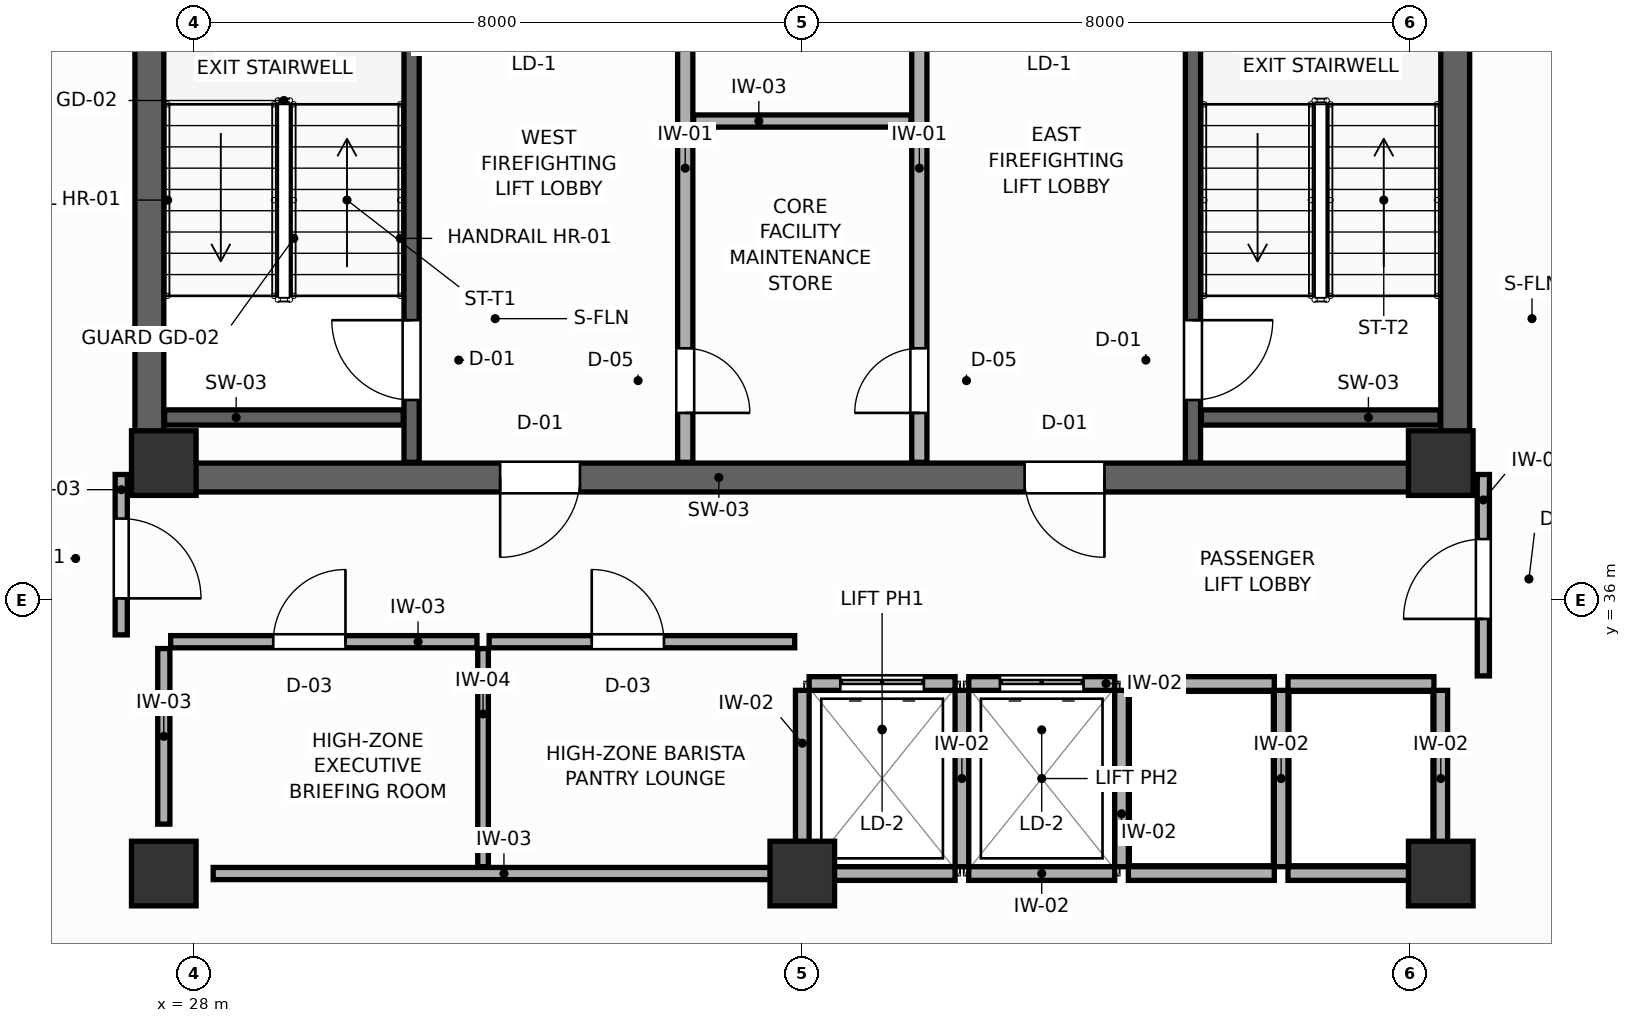
"""IFC4 building model, lengths in metres.
Left out: names, types, materials, properties, quantities, classifications, styles, units other than length and angle.
Written with IfcOpenShell. Run it as: python <this file> out.ifc"""

import sys

from ifc_helpers import new_model, si_unit, direction, frame, frame_2d, origin, origin_2d, place, context, subcontext, project, spatial, rectangle, extrude, source, transform, mapped, element, fill, save


model = new_model("IFC4")
c1 = context("Model", 3, precision=1e-05, world=origin(), true_north=direction((0.0, 1.0)))
c2 = subcontext(c1, "Body", "Model", "MODEL_VIEW")
j1 = project(units=[si_unit("LENGTHUNIT", "METRE"), si_unit("PLANEANGLEUNIT", "RADIAN")], contexts=[c1])
p1 = place(None, origin())
s1 = spatial("IfcSite", under=j1, at=p1, CompositionType="ELEMENT")
p2 = place(p1, origin())
s2 = spatial("IfcBuilding", under=s1, at=p2, CompositionType="ELEMENT")
p3 = place(p2, frame((0.0, 0.0, 246.6)))
s3 = spatial("IfcBuildingStorey", under=s2, at=p3, CompositionType="ELEMENT", Elevation=246.6)
p4 = place(p3, frame((27.22, 37.61, 0.0), z_axis=(0.0, 0.0, 1.0), x_axis=(1.0, 0.0, 0.0)))
e1 = element("IfcWall", 1, at=p4, inside=s3, PredefinedType="SHEAR", context=c2, shape_type="SweptSolid", body=[
    extrude(rectangle(XDim=17.56, YDim=0.38, at=frame_2d((8.78, 0.0))), origin(), (0.0, 0.0, 1.0), 3.6),
])
p5 = place(p4, frame((4.805, 0.0, 0.0)))
e2 = element("IfcOpeningElement", 2, at=p5, cuts=e1, PredefinedType="OPENING", context=c2, shape_type="SweptSolid", body=[
    extrude(rectangle(XDim=1.05, YDim=2.1, at=frame_2d((0.525, 1.05))), frame((0.0, 0.2, 0.0), z_axis=(0.0, -1.0, 0.0), x_axis=(1.0, 0.0, 0.0)), (0.0, 0.0, 1.0), 0.4),
])
p6 = place(p4, frame((11.705, 0.0, 0.0)))
e3 = element("IfcOpeningElement", 3, at=p6, cuts=e1, PredefinedType="OPENING", context=c2, shape_type="SweptSolid", body=[
    extrude(rectangle(XDim=1.05, YDim=2.1, at=frame_2d((0.525, 1.05))), frame((0.0, 0.2, 0.0), z_axis=(0.0, -1.0, 0.0), x_axis=(1.0, 0.0, 0.0)), (0.0, 0.0, 1.0), 0.4),
])
for number, where, z_axis, x_axis in (
    (4, (27.41, 37.8, 0.0), (0.0, 0.0, 1.0), (0.0, 1.0, 0.0)),
    (5, (44.59, 37.8, 0.0), (0.0, 0.0, 1.0), (0.0, 1.0, 0.0)),
):
    element("IfcWall", number, at=place(p3, frame(where, z_axis=z_axis, x_axis=x_axis)), inside=s3, PredefinedType="SHEAR", context=c2, shape_type="SweptSolid", body=[
        extrude(rectangle(XDim=9.0, YDim=0.38, at=frame_2d((4.5, 0.0))), origin(), (0.0, 0.0, 1.0), 3.6),
    ])
m1 = source(origin(), c2, "Body", "SweptSolid", [
    extrude(rectangle(XDim=0.85, YDim=0.85, at=origin_2d()), origin(), (0.0, 0.0, 1.0), 3.6),
])
for number, where, z_axis, x_axis in (
    (6, (27.6, 37.8, 0.0), (0.0, 0.0, 1.0), (1.0, 0.0, 0.0)),
    (7, (44.4, 37.8, 0.0), (0.0, 0.0, 1.0), (1.0, 0.0, 0.0)),
    (8, (27.6, 32.4, 0.0), (0.0, 0.0, 1.0), (1.0, 0.0, 0.0)),
    (9, (44.4, 32.4, 0.0), (0.0, 0.0, 1.0), (1.0, 0.0, 0.0)),
    (10, (36.0, 32.4, 0.0), (0.0, 0.0, 1.0), (1.0, 0.0, 0.0)),
):
    element("IfcColumn", number, at=place(p3, frame(where, z_axis=z_axis, x_axis=x_axis)), inside=s3, PredefinedType="COLUMN", context=c2, shape_type="MappedRepresentation", body=[
        mapped(m1, transform((0.0, 0.0, 0.0), scale=1.0)),
    ])
p7 = place(p3, frame((30.86, 37.81, 0.0), z_axis=(0.0, 0.0, 1.0), x_axis=(0.0, 1.0, 0.0)))
e11 = element("IfcWall", 11, at=p7, inside=s3, PredefinedType="SHEAR", context=c2, shape_type="SweptSolid", body=[
    extrude(rectangle(XDim=8.98, YDim=0.2, at=frame_2d((4.49, 0.0))), origin(), (0.0, 0.0, 1.0), 3.6),
])
p8 = place(p7, frame((0.82, 0.0, 0.0)))
e12 = element("IfcOpeningElement", 12, at=p8, cuts=e11, PredefinedType="OPENING", context=c2, shape_type="SweptSolid", body=[
    extrude(rectangle(XDim=1.05, YDim=2.1, at=frame_2d((0.525, 1.05))), frame((0.0, 0.11, 0.0), z_axis=(0.0, -1.0, 0.0), x_axis=(1.0, 0.0, 0.0)), (0.0, 0.0, 1.0), 0.22),
])
p9 = place(p3, frame((27.61, 38.4, 0.0), z_axis=(0.0, 0.0, 1.0), x_axis=(1.0, 0.0, 0.0)))
e13 = element("IfcWall", 13, at=p9, inside=s3, PredefinedType="SHEAR", context=c2, shape_type="SweptSolid", body=[
    extrude(rectangle(XDim=3.14, YDim=0.2, at=frame_2d((1.57, 0.0))), origin(), (0.0, 0.0, 1.0), 3.6),
])
p10 = place(p3, frame((41.14, 37.81, 0.0), z_axis=(0.0, 0.0, 1.0), x_axis=(0.0, 1.0, 0.0)))
e14 = element("IfcWall", 14, at=p10, inside=s3, PredefinedType="SHEAR", context=c2, shape_type="SweptSolid", body=[
    extrude(rectangle(XDim=8.98, YDim=0.2, at=frame_2d((4.49, 0.0))), origin(), (0.0, 0.0, 1.0), 3.6),
])
p11 = place(p10, frame((0.82, 0.0, 0.0)))
e15 = element("IfcOpeningElement", 15, at=p11, cuts=e14, PredefinedType="OPENING", context=c2, shape_type="SweptSolid", body=[
    extrude(rectangle(XDim=1.05, YDim=2.1, at=frame_2d((0.525, 1.05))), frame((0.0, 0.11, 0.0), z_axis=(0.0, -1.0, 0.0), x_axis=(1.0, 0.0, 0.0)), (0.0, 0.0, 1.0), 0.22),
])
p12 = place(p3, frame((41.25, 38.4, 0.0), z_axis=(0.0, 0.0, 1.0), x_axis=(1.0, 0.0, 0.0)))
e16 = element("IfcWall", 16, at=p12, inside=s3, PredefinedType="SHEAR", context=c2, shape_type="SweptSolid", body=[
    extrude(rectangle(XDim=3.14, YDim=0.2, at=frame_2d((1.57, 0.0))), origin(), (0.0, 0.0, 1.0), 3.6),
])
p13 = place(p3, frame((34.46, 37.81, 0.0), z_axis=(0.0, 0.0, 1.0), x_axis=(0.0, 1.0, 0.0)))
e17 = element("IfcWall", 17, at=p13, inside=s3, PredefinedType="PARTITIONING", context=c2, shape_type="SweptSolid", body=[
    extrude(rectangle(XDim=8.98, YDim=0.2, at=frame_2d((4.49, 0.0))), origin(), (0.0, 0.0, 1.0), 3.41),
])
p14 = place(p13, frame((0.65, 0.0, 0.0)))
e18 = element("IfcOpeningElement", 18, at=p14, cuts=e17, PredefinedType="OPENING", context=c2, shape_type="SweptSolid", body=[
    extrude(rectangle(XDim=0.85, YDim=2.05, at=frame_2d((0.425, 1.025))), frame((0.0, 0.11, 0.0), z_axis=(0.0, -1.0, 0.0), x_axis=(1.0, 0.0, 0.0)), (0.0, 0.0, 1.0), 0.22),
])
p15 = place(p3, frame((37.54, 37.81, 0.0), z_axis=(0.0, 0.0, 1.0), x_axis=(0.0, 1.0, 0.0)))
e19 = element("IfcWall", 19, at=p15, inside=s3, PredefinedType="PARTITIONING", context=c2, shape_type="SweptSolid", body=[
    extrude(rectangle(XDim=8.98, YDim=0.2, at=frame_2d((4.49, 0.0))), origin(), (0.0, 0.0, 1.0), 3.41),
])
p16 = place(p15, frame((0.65, 0.0, 0.0)))
e20 = element("IfcOpeningElement", 20, at=p16, cuts=e19, PredefinedType="OPENING", context=c2, shape_type="SweptSolid", body=[
    extrude(rectangle(XDim=0.85, YDim=2.05, at=frame_2d((0.425, 1.025))), frame((0.0, 0.11, 0.0), z_axis=(0.0, -1.0, 0.0), x_axis=(1.0, 0.0, 0.0)), (0.0, 0.0, 1.0), 0.22),
])
p17 = place(p3, frame((34.57, 42.3, 0.0), z_axis=(0.0, 0.0, 1.0), x_axis=(1.0, 0.0, 0.0)))
e21 = element("IfcWall", 21, at=p17, inside=s3, PredefinedType="PARTITIONING", context=c2, shape_type="SweptSolid", body=[
    extrude(rectangle(XDim=2.86, YDim=0.16, at=frame_2d((1.43, 0.0))), origin(), (0.0, 0.0, 1.0), 3.41),
])
p18 = place(p3, frame((36.09, 34.9, 0.0), z_axis=(0.0, 0.0, 1.0), x_axis=(1.0, 0.0, 0.0)))
e22 = element("IfcWall", 22, at=p18, inside=s3, PredefinedType="PARTITIONING", context=c2, shape_type="SweptSolid", body=[
    extrude(rectangle(XDim=1.92, YDim=0.18, at=frame_2d((0.96, 0.0))), origin(), (0.0, 0.0, 1.0), 3.41),
])
p19 = place(p18, frame((0.41, 0.0, 0.0)))
e23 = element("IfcOpeningElement", 23, at=p19, cuts=e22, PredefinedType="OPENING", context=c2, shape_type="SweptSolid", body=[
    extrude(rectangle(XDim=1.1, YDim=2.1, at=frame_2d((0.55, 1.05))), frame((0.0, 0.1, 0.0), z_axis=(0.0, -1.0, 0.0), x_axis=(1.0, 0.0, 0.0)), (0.0, 0.0, 1.0), 0.2),
])
p20 = place(p3, frame((36.09, 32.4, 0.0), z_axis=(0.0, 0.0, 1.0), x_axis=(1.0, 0.0, 0.0)))
e24 = element("IfcWall", 24, at=p20, inside=s3, PredefinedType="PARTITIONING", context=c2, shape_type="SweptSolid", body=[
    extrude(rectangle(XDim=1.92, YDim=0.18, at=frame_2d((0.96, 0.0))), origin(), (0.0, 0.0, 1.0), 3.08),
])
p21 = place(p3, frame((36.0, 32.49, 0.0), z_axis=(0.0, 0.0, 1.0), x_axis=(0.0, 1.0, 0.0)))
e25 = element("IfcWall", 25, at=p21, inside=s3, PredefinedType="PARTITIONING", context=c2, shape_type="SweptSolid", body=[
    extrude(rectangle(XDim=2.32, YDim=0.18, at=frame_2d((1.16, 0.0))), origin(), (0.0, 0.0, 1.0), 3.41),
])
p22 = place(p3, frame((38.19, 34.9, 0.0), z_axis=(0.0, 0.0, 1.0), x_axis=(1.0, 0.0, 0.0)))
e26 = element("IfcWall", 26, at=p22, inside=s3, PredefinedType="PARTITIONING", context=c2, shape_type="SweptSolid", body=[
    extrude(rectangle(XDim=1.92, YDim=0.18, at=frame_2d((0.96, 0.0))), origin(), (0.0, 0.0, 1.0), 3.41),
])
p23 = place(p22, frame((0.41, 0.0, 0.0)))
e27 = element("IfcOpeningElement", 27, at=p23, cuts=e26, PredefinedType="OPENING", context=c2, shape_type="SweptSolid", body=[
    extrude(rectangle(XDim=1.1, YDim=2.1, at=frame_2d((0.55, 1.05))), frame((0.0, 0.1, 0.0), z_axis=(0.0, -1.0, 0.0), x_axis=(1.0, 0.0, 0.0)), (0.0, 0.0, 1.0), 0.2),
])
p24 = place(p3, frame((38.19, 32.4, 0.0), z_axis=(0.0, 0.0, 1.0), x_axis=(1.0, 0.0, 0.0)))
e28 = element("IfcWall", 28, at=p24, inside=s3, PredefinedType="PARTITIONING", context=c2, shape_type="SweptSolid", body=[
    extrude(rectangle(XDim=1.92, YDim=0.18, at=frame_2d((0.96, 0.0))), origin(), (0.0, 0.0, 1.0), 3.08),
])
p25 = place(p3, frame((38.1, 32.49, 0.0), z_axis=(0.0, 0.0, 1.0), x_axis=(0.0, 1.0, 0.0)))
e29 = element("IfcWall", 29, at=p25, inside=s3, PredefinedType="PARTITIONING", context=c2, shape_type="SweptSolid", body=[
    extrude(rectangle(XDim=2.32, YDim=0.18, at=frame_2d((1.16, 0.0))), origin(), (0.0, 0.0, 1.0), 3.41),
])
p26 = place(p3, frame((40.29, 34.9, 0.0), z_axis=(0.0, 0.0, 1.0), x_axis=(1.0, 0.0, 0.0)))
e30 = element("IfcWall", 30, at=p26, inside=s3, PredefinedType="PARTITIONING", context=c2, shape_type="SweptSolid", body=[
    extrude(rectangle(XDim=1.92, YDim=0.18, at=frame_2d((0.96, 0.0))), origin(), (0.0, 0.0, 1.0), 3.41),
])
p27 = place(p3, frame((40.29, 32.4, 0.0), z_axis=(0.0, 0.0, 1.0), x_axis=(1.0, 0.0, 0.0)))
e31 = element("IfcWall", 31, at=p27, inside=s3, PredefinedType="PARTITIONING", context=c2, shape_type="SweptSolid", body=[
    extrude(rectangle(XDim=1.92, YDim=0.18, at=frame_2d((0.96, 0.0))), origin(), (0.0, 0.0, 1.0), 3.08),
])
p28 = place(p3, frame((40.2, 32.49, 0.0), z_axis=(0.0, 0.0, 1.0), x_axis=(0.0, 1.0, 0.0)))
e32 = element("IfcWall", 32, at=p28, inside=s3, PredefinedType="PARTITIONING", context=c2, shape_type="SweptSolid", body=[
    extrude(rectangle(XDim=2.32, YDim=0.18, at=frame_2d((1.16, 0.0))), origin(), (0.0, 0.0, 1.0), 3.41),
])
p29 = place(p3, frame((42.39, 34.9, 0.0), z_axis=(0.0, 0.0, 1.0), x_axis=(1.0, 0.0, 0.0)))
e33 = element("IfcWall", 33, at=p29, inside=s3, PredefinedType="PARTITIONING", context=c2, shape_type="SweptSolid", body=[
    extrude(rectangle(XDim=1.92, YDim=0.18, at=frame_2d((0.96, 0.0))), origin(), (0.0, 0.0, 1.0), 3.41),
])
p30 = place(p3, frame((42.39, 32.4, 0.0), z_axis=(0.0, 0.0, 1.0), x_axis=(1.0, 0.0, 0.0)))
e34 = element("IfcWall", 34, at=p30, inside=s3, PredefinedType="PARTITIONING", context=c2, shape_type="SweptSolid", body=[
    extrude(rectangle(XDim=1.92, YDim=0.18, at=frame_2d((0.96, 0.0))), origin(), (0.0, 0.0, 1.0), 3.08),
])
for number, where, z_axis, x_axis in (
    (35, (42.3, 32.49, 0.0), (0.0, 0.0, 1.0), (0.0, 1.0, 0.0)),
    (36, (44.4, 32.49, 0.0), (0.0, 0.0, 1.0), (0.0, 1.0, 0.0)),
):
    element("IfcWall", number, at=place(p3, frame(where, z_axis=z_axis, x_axis=x_axis)), inside=s3, PredefinedType="PARTITIONING", context=c2, shape_type="SweptSolid", body=[
        extrude(rectangle(XDim=2.32, YDim=0.18, at=frame_2d((1.16, 0.0))), origin(), (0.0, 0.0, 1.0), 3.41),
    ])
p31 = place(p3, frame((28.25, 32.4, 0.0), z_axis=(0.0, 0.0, 1.0), x_axis=(1.0, 0.0, 0.0)))
e37 = element("IfcWall", 37, at=p31, inside=s3, PredefinedType="PARTITIONING", context=c2, shape_type="SweptSolid", body=[
    extrude(rectangle(XDim=7.65, YDim=0.16, at=frame_2d((3.825, 0.0))), origin(), (0.0, 0.0, 1.0), 3.08),
])
p32 = place(p3, frame((27.6, 33.05, 0.0), z_axis=(0.0, 0.0, 1.0), x_axis=(0.0, 1.0, 0.0)))
e38 = element("IfcWall", 38, at=p32, inside=s3, PredefinedType="PARTITIONING", context=c2, shape_type="SweptSolid", body=[
    extrude(rectangle(XDim=2.31, YDim=0.16, at=frame_2d((1.155, 0.0))), origin(), (0.0, 0.0, 1.0), 3.41),
])
p33 = place(p3, frame((31.8, 32.49, 0.0), z_axis=(0.0, 0.0, 1.0), x_axis=(0.0, 1.0, 0.0)))
e39 = element("IfcWall", 39, at=p33, inside=s3, PredefinedType="PARTITIONING", context=c2, shape_type="SweptSolid", body=[
    extrude(rectangle(XDim=2.87, YDim=0.14, at=frame_2d((1.435, 0.0))), origin(), (0.0, 0.0, 1.0), 3.41),
])
p34 = place(p3, frame((27.69, 35.45, 0.0), z_axis=(0.0, 0.0, 1.0), x_axis=(1.0, 0.0, 0.0)))
e40 = element("IfcWall", 40, at=p34, inside=s3, PredefinedType="PARTITIONING", context=c2, shape_type="SweptSolid", body=[
    extrude(rectangle(XDim=4.03, YDim=0.16, at=frame_2d((2.015, 0.0))), origin(), (0.0, 0.0, 1.0), 3.41),
])
p35 = place(p34, frame((1.35, 0.0, 0.0)))
e41 = element("IfcOpeningElement", 41, at=p35, cuts=e40, PredefinedType="OPENING", context=c2, shape_type="SweptSolid", body=[
    extrude(rectangle(XDim=0.95, YDim=2.05, at=frame_2d((0.475, 1.025))), frame((0.0, 0.09, 0.0), z_axis=(0.0, -1.0, 0.0), x_axis=(1.0, 0.0, 0.0)), (0.0, 0.0, 1.0), 0.18),
])
p36 = place(p3, frame((31.88, 35.45, 0.0), z_axis=(0.0, 0.0, 1.0), x_axis=(1.0, 0.0, 0.0)))
e42 = element("IfcWall", 42, at=p36, inside=s3, PredefinedType="PARTITIONING", context=c2, shape_type="SweptSolid", body=[
    extrude(rectangle(XDim=4.02, YDim=0.16, at=frame_2d((2.01, 0.0))), origin(), (0.0, 0.0, 1.0), 3.41),
])
p37 = place(p36, frame((1.35, 0.0, 0.0)))
e43 = element("IfcOpeningElement", 43, at=p37, cuts=e42, PredefinedType="OPENING", context=c2, shape_type="SweptSolid", body=[
    extrude(rectangle(XDim=0.95, YDim=2.05, at=frame_2d((0.475, 1.025))), frame((0.0, 0.09, 0.0), z_axis=(0.0, -1.0, 0.0), x_axis=(1.0, 0.0, 0.0)), (0.0, 0.0, 1.0), 0.18),
])
p38 = place(p3, frame((27.04, 35.54, 0.0), z_axis=(0.0, 0.0, 1.0), x_axis=(0.0, 1.0, 0.0)))
e44 = element("IfcWall", 44, at=p38, inside=s3, PredefinedType="PARTITIONING", context=c2, shape_type="SweptSolid", body=[
    extrude(rectangle(XDim=2.11, YDim=0.16, at=frame_2d((1.055, 0.0))), origin(), (0.0, 0.0, 1.0), 3.41),
])
p39 = place(p38, frame((0.48, 0.0, 0.0)))
e45 = element("IfcOpeningElement", 45, at=p39, cuts=e44, PredefinedType="OPENING", context=c2, shape_type="SweptSolid", body=[
    extrude(rectangle(XDim=1.05, YDim=2.1, at=frame_2d((0.525, 1.05))), frame((0.0, 0.09, 0.0), z_axis=(0.0, -1.0, 0.0), x_axis=(1.0, 0.0, 0.0)), (0.0, 0.0, 1.0), 0.18),
])
p40 = place(p3, frame((44.96, 35.0, 0.0), z_axis=(0.0, 0.0, 1.0), x_axis=(0.0, 1.0, 0.0)))
e46 = element("IfcWall", 46, at=p40, inside=s3, PredefinedType="PARTITIONING", context=c2, shape_type="SweptSolid", body=[
    extrude(rectangle(XDim=2.65, YDim=0.16, at=frame_2d((1.325, 0.0))), origin(), (0.0, 0.0, 1.0), 3.41),
])
p41 = place(p40, frame((0.75, 0.0, 0.0)))
e47 = element("IfcOpeningElement", 47, at=p41, cuts=e46, PredefinedType="OPENING", context=c2, shape_type="SweptSolid", body=[
    extrude(rectangle(XDim=1.05, YDim=2.1, at=frame_2d((0.525, 1.05))), frame((0.0, 0.09, 0.0), z_axis=(0.0, -1.0, 0.0), x_axis=(1.0, 0.0, 0.0)), (0.0, 0.0, 1.0), 0.18),
])
p42 = place(p8, origin())
e48 = element("IfcDoor", 48, at=p42, inside=s3, OperationType="SINGLE_SWING_RIGHT", PredefinedType="DOOR", context=c2, shape_type="SweptSolid", body=[
    extrude(rectangle(XDim=1.05, YDim=2.1, at=frame_2d((0.525, 1.05))), frame((0.0, 0.025, 0.0), z_axis=(0.0, -1.0, 0.0), x_axis=(1.0, 0.0, 0.0)), (0.0, 0.0, 1.0), 0.05),
])
fill(e12, e48)
p43 = place(p11, frame((1.05, 0.0, 0.0), z_axis=(0.0, 0.0, 1.0), x_axis=(-1.0, 0.0, 0.0)))
e49 = element("IfcDoor", 49, at=p43, inside=s3, OperationType="SINGLE_SWING_LEFT", PredefinedType="DOOR", context=c2, shape_type="SweptSolid", body=[
    extrude(rectangle(XDim=1.05, YDim=2.1, at=frame_2d((0.525, 1.05))), frame((0.0, 0.025, 0.0), z_axis=(0.0, -1.0, 0.0), x_axis=(1.0, 0.0, 0.0)), (0.0, 0.0, 1.0), 0.05),
])
fill(e15, e49)
p44 = place(p14, frame((0.85, 0.0, 0.0), z_axis=(0.0, 0.0, 1.0), x_axis=(-1.0, 0.0, 0.0)))
e50 = element("IfcDoor", 50, at=p44, inside=s3, OperationType="SINGLE_SWING_RIGHT", PredefinedType="DOOR", context=c2, shape_type="SweptSolid", body=[
    extrude(rectangle(XDim=0.85, YDim=2.05, at=frame_2d((0.425, 1.025))), frame((0.0, 0.025, 0.0), z_axis=(0.0, -1.0, 0.0), x_axis=(1.0, 0.0, 0.0)), (0.0, 0.0, 1.0), 0.05),
])
fill(e18, e50)
p45 = place(p16, origin())
e51 = element("IfcDoor", 51, at=p45, inside=s3, OperationType="SINGLE_SWING_LEFT", PredefinedType="DOOR", context=c2, shape_type="SweptSolid", body=[
    extrude(rectangle(XDim=0.85, YDim=2.05, at=frame_2d((0.425, 1.025))), frame((0.0, 0.025, 0.0), z_axis=(0.0, -1.0, 0.0), x_axis=(1.0, 0.0, 0.0)), (0.0, 0.0, 1.0), 0.05),
])
fill(e20, e51)
p46 = place(p19, origin())
e52 = element("IfcDoor", 52, at=p46, inside=s3, OperationType="DOUBLE_DOOR_SLIDING", PredefinedType="DOOR", context=c2, shape_type="SweptSolid", body=[
    extrude(rectangle(XDim=1.1, YDim=2.1, at=frame_2d((0.55, 1.05))), frame((0.0, 0.025, 0.0), z_axis=(0.0, -1.0, 0.0), x_axis=(1.0, 0.0, 0.0)), (0.0, 0.0, 1.0), 0.05),
])
fill(e23, e52)
p47 = place(p23, origin())
e53 = element("IfcDoor", 53, at=p47, inside=s3, OperationType="DOUBLE_DOOR_SLIDING", PredefinedType="DOOR", context=c2, shape_type="SweptSolid", body=[
    extrude(rectangle(XDim=1.1, YDim=2.1, at=frame_2d((0.55, 1.05))), frame((0.0, 0.025, 0.0), z_axis=(0.0, -1.0, 0.0), x_axis=(1.0, 0.0, 0.0)), (0.0, 0.0, 1.0), 0.05),
])
fill(e27, e53)
p48 = place(p35, origin())
e54 = element("IfcDoor", 54, at=p48, inside=s3, OperationType="SINGLE_SWING_RIGHT", PredefinedType="DOOR", context=c2, shape_type="SweptSolid", body=[
    extrude(rectangle(XDim=0.95, YDim=2.05, at=frame_2d((0.475, 1.025))), frame((0.0, 0.025, 0.0), z_axis=(0.0, -1.0, 0.0), x_axis=(1.0, 0.0, 0.0)), (0.0, 0.0, 1.0), 0.05),
])
fill(e41, e54)
p49 = place(p37, origin())
e55 = element("IfcDoor", 55, at=p49, inside=s3, OperationType="SINGLE_SWING_LEFT", PredefinedType="DOOR", context=c2, shape_type="SweptSolid", body=[
    extrude(rectangle(XDim=0.95, YDim=2.05, at=frame_2d((0.475, 1.025))), frame((0.0, 0.025, 0.0), z_axis=(0.0, -1.0, 0.0), x_axis=(1.0, 0.0, 0.0)), (0.0, 0.0, 1.0), 0.05),
])
fill(e43, e55)
p50 = place(p39, frame((1.05, 0.0, 0.0), z_axis=(0.0, 0.0, 1.0), x_axis=(-1.0, 0.0, 0.0)))
e56 = element("IfcDoor", 56, at=p50, inside=s3, OperationType="SINGLE_SWING_RIGHT", PredefinedType="DOOR", context=c2, shape_type="SweptSolid", body=[
    extrude(rectangle(XDim=1.05, YDim=2.1, at=frame_2d((0.525, 1.05))), frame((0.0, 0.025, 0.0), z_axis=(0.0, -1.0, 0.0), x_axis=(1.0, 0.0, 0.0)), (0.0, 0.0, 1.0), 0.05),
])
fill(e45, e56)
p51 = place(p41, origin())
e57 = element("IfcDoor", 57, at=p51, inside=s3, OperationType="SINGLE_SWING_LEFT", PredefinedType="DOOR", context=c2, shape_type="SweptSolid", body=[
    extrude(rectangle(XDim=1.05, YDim=2.1, at=frame_2d((0.525, 1.05))), frame((0.0, 0.025, 0.0), z_axis=(0.0, -1.0, 0.0), x_axis=(1.0, 0.0, 0.0)), (0.0, 0.0, 1.0), 0.05),
])
fill(e47, e57)
p52 = place(p5, frame((1.05, 0.0, 0.0), z_axis=(0.0, 0.0, 1.0), x_axis=(-1.0, 0.0, 0.0)))
e58 = element("IfcDoor", 58, at=p52, inside=s3, OperationType="SINGLE_SWING_RIGHT", PredefinedType="DOOR", context=c2, shape_type="SweptSolid", body=[
    extrude(rectangle(XDim=1.05, YDim=2.1, at=frame_2d((0.525, 1.05))), frame((0.0, 0.025, 0.0), z_axis=(0.0, -1.0, 0.0), x_axis=(1.0, 0.0, 0.0)), (0.0, 0.0, 1.0), 0.05),
])
fill(e2, e58)
p53 = place(p6, frame((1.05, 0.0, 0.0), z_axis=(0.0, 0.0, 1.0), x_axis=(-1.0, 0.0, 0.0)))
e59 = element("IfcDoor", 59, at=p53, inside=s3, OperationType="SINGLE_SWING_LEFT", PredefinedType="DOOR", context=c2, shape_type="SweptSolid", body=[
    extrude(rectangle(XDim=1.05, YDim=2.1, at=frame_2d((0.525, 1.05))), frame((0.0, 0.025, 0.0), z_axis=(0.0, -1.0, 0.0), x_axis=(1.0, 0.0, 0.0)), (0.0, 0.0, 1.0), 0.05),
])
fill(e3, e59)
save(model, sys.argv[1])
